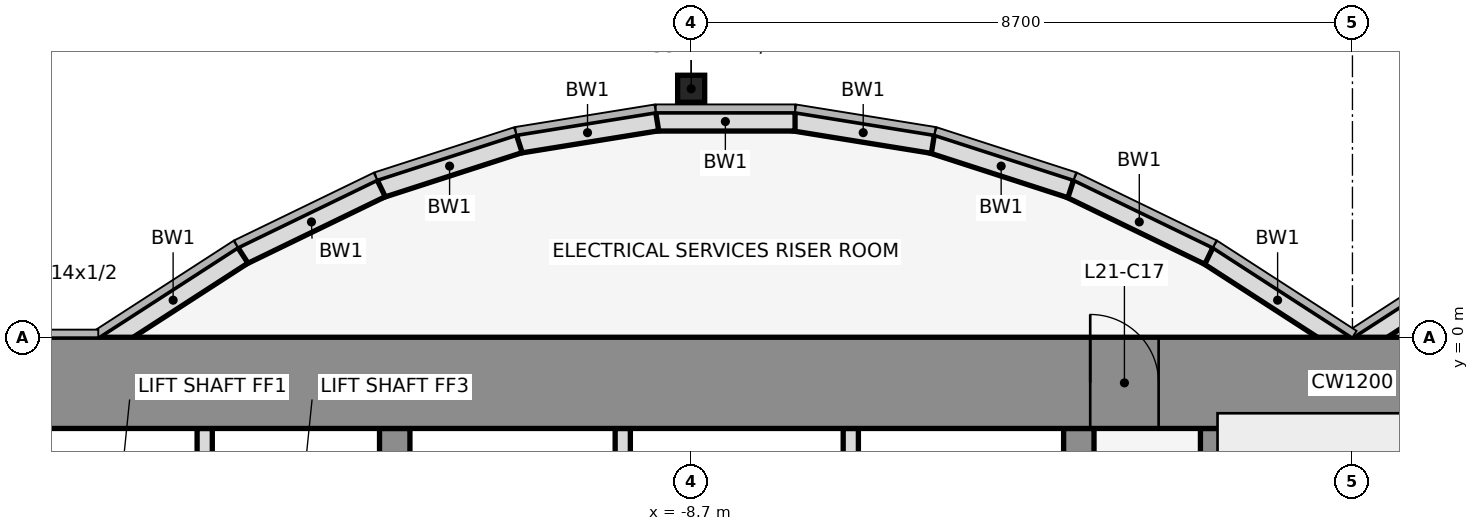
"""IFC4 building model, lengths in metres.
Left out: names, types, materials, properties, quantities, classifications, styles, units other than length and angle.
Written with IfcOpenShell. Run it as: python <this file> out.ifc"""

import sys

from ifc_helpers import new_model, si_unit, direction, frame, frame_2d, origin, origin_2d, place, context, subcontext, project, spatial, rectangle, hollow_rectangle, extrude, element, fill, save


model = new_model("IFC4")
c1 = context("Model", 3, precision=1e-05, world=origin(), true_north=direction((0.0, 1.0)))
c2 = subcontext(c1, "Body", "Model", "MODEL_VIEW")
j1 = project(units=[si_unit("LENGTHUNIT", "METRE"), si_unit("PLANEANGLEUNIT", "RADIAN")], contexts=[c1])
p1 = place(None, origin())
s1 = spatial("IfcSite", under=j1, at=p1, CompositionType="ELEMENT")
p2 = place(p1, origin())
s2 = spatial("IfcBuilding", under=s1, at=p2, CompositionType="ELEMENT")
p3 = place(p2, frame((0.0, 0.0, 102.2)))
s3 = spatial("IfcBuildingStorey", under=s2, at=p3, CompositionType="ELEMENT", Elevation=102.2)
p4 = place(p3, frame((-8.7, 3.269, 0.0), z_axis=(0.0, 0.0, 1.0), x_axis=(1.0, 0.0, 0.0)))
e1 = element("IfcColumn", 1, at=p4, inside=s3, PredefinedType="COLUMN", context=c2, shape_type="SweptSolid", body=[
    extrude(hollow_rectangle(XDim=0.356, YDim=0.356, WallThickness=0.012, at=origin_2d()), origin(), (0.0, 0.0, 1.0), 4.1),
])
for number, where, z_axis, x_axis in (
    (2, (1.901, 1.08, 0.0), (0.0, 0.0, 1.0), (-0.84, -0.543, 0.0)),
    (3, (-0.068, -0.105, 0.0), (0.0, 0.0, 1.0), (-0.84, 0.543, 0.0)),
):
    element("IfcWall", number, at=place(p3, frame(where, z_axis=z_axis, x_axis=x_axis)), inside=s3, PredefinedType="STANDARD", context=c2, shape_type="SweptSolid", body=[
        extrude(rectangle(XDim=2.183, YDim=0.25, at=frame_2d((1.091, 0.0))), origin(), (0.0, 0.0, 1.0), 3.95),
    ])
p5 = place(p3, frame((-1.888, 1.073, 0.0), z_axis=(0.0, 0.0, 1.0), x_axis=(-0.89982408427, 0.436252928206, 0.0)))
e4 = element("IfcWall", 4, at=p5, inside=s3, PredefinedType="STANDARD", context=c2, shape_type="SweptSolid", body=[
    extrude(rectangle(XDim=2.038, YDim=0.25, at=frame_2d((1.019, 0.0))), origin(), (0.0, 0.0, 1.0), 3.95),
])
p6 = place(p3, frame((-3.705, 1.955, 0.0), z_axis=(0.0, 0.0, 1.0), x_axis=(-0.951495806175, 0.307661714928, 0.0)))
e5 = element("IfcWall", 5, at=p6, inside=s3, PredefinedType="STANDARD", context=c2, shape_type="SweptSolid", body=[
    extrude(rectangle(XDim=1.927, YDim=0.25, at=frame_2d((0.963, 0.0))), origin(), (0.0, 0.0, 1.0), 3.95),
])
p7 = place(p3, frame((-5.52, 2.543, 0.0), z_axis=(0.0, 0.0, 1.0), x_axis=(-0.987181718931, 0.159600293885, 0.0)))
e6 = element("IfcWall", 6, at=p7, inside=s3, PredefinedType="STANDARD", context=c2, shape_type="SweptSolid", body=[
    extrude(rectangle(XDim=1.857, YDim=0.25, at=frame_2d((0.929, 0.0))), origin(), (0.0, 0.0, 1.0), 3.95),
])
p8 = place(p3, frame((-7.333, 2.838, 0.0), z_axis=(0.0, 0.0, 1.0), x_axis=(-1.0, 0.0, 0.0)))
e7 = element("IfcWall", 7, at=p8, inside=s3, PredefinedType="STANDARD", context=c2, shape_type="SweptSolid", body=[
    extrude(rectangle(XDim=1.833, YDim=0.25, at=frame_2d((0.917, 0.0))), origin(), (0.0, 0.0, 1.0), 3.95),
])
p9 = place(p3, frame((-9.147, 2.84, 0.0), z_axis=(0.0, 0.0, 1.0), x_axis=(-0.987181718931, -0.159600293885, 0.0)))
e8 = element("IfcWall", 8, at=p9, inside=s3, PredefinedType="STANDARD", context=c2, shape_type="SweptSolid", body=[
    extrude(rectangle(XDim=1.857, YDim=0.25, at=frame_2d((0.929, 0.0))), origin(), (0.0, 0.0, 1.0), 3.95),
])
p10 = place(p3, frame((-10.962, 2.548, 0.0), z_axis=(0.0, 0.0, 1.0), x_axis=(-0.951495806175, -0.307661714928, 0.0)))
e9 = element("IfcWall", 9, at=p10, inside=s3, PredefinedType="STANDARD", context=c2, shape_type="SweptSolid", body=[
    extrude(rectangle(XDim=1.927, YDim=0.25, at=frame_2d((0.963, 0.0))), origin(), (0.0, 0.0, 1.0), 3.95),
])
p11 = place(p3, frame((-12.779, 1.962, 0.0), z_axis=(0.0, 0.0, 1.0), x_axis=(-0.89982408427, -0.436252928206, 0.0)))
e10 = element("IfcWall", 10, at=p11, inside=s3, PredefinedType="STANDARD", context=c2, shape_type="SweptSolid", body=[
    extrude(rectangle(XDim=2.038, YDim=0.25, at=frame_2d((1.019, 0.0))), origin(), (0.0, 0.0, 1.0), 3.95),
])
p12 = place(p3, frame((-14.599, 1.08, 0.0), z_axis=(0.0, 0.0, 1.0), x_axis=(-0.83981312244, -0.542875602121, 0.0)))
e11 = element("IfcWall", 11, at=p12, inside=s3, PredefinedType="STANDARD", context=c2, shape_type="SweptSolid", body=[
    extrude(rectangle(XDim=2.183, YDim=0.25, at=frame_2d((1.091, 0.0))), origin(), (0.0, 0.0, 1.0), 3.95),
])
p13 = place(p3, frame((-15.1, -4.6, 0.0), z_axis=(0.0, 0.0, 1.0), x_axis=(0.0, 1.0, 0.0)))
e12 = element("IfcWall", 12, at=p13, inside=s3, PredefinedType="PARTITIONING", context=c2, shape_type="SweptSolid", body=[
    extrude(rectangle(XDim=3.4, YDim=0.2, at=frame_2d((1.7, 0.0))), origin(), (0.0, 0.0, 1.0), 3.018),
])
p14 = place(p3, frame((-12.6, -11.8, 0.0), z_axis=(0.0, 0.0, 1.0), x_axis=(0.0, 1.0, 0.0)))
e13 = element("IfcWall", 13, at=p14, inside=s3, PredefinedType="SHEAR", context=c2, shape_type="SweptSolid", body=[
    extrude(rectangle(XDim=10.6, YDim=0.4, at=frame_2d((5.3, 0.0))), origin(), (0.0, 0.0, 1.0), 4.1),
])
p15 = place(p14, frame((4.75, 0.0, 0.0)))
e14 = element("IfcOpeningElement", 14, at=p15, cuts=e13, PredefinedType="OPENING", context=c2, shape_type="SweptSolid", body=[
    extrude(rectangle(XDim=1.1, YDim=2.1, at=frame_2d((0.55, 1.05))), frame((0.0, 0.212, 0.0), z_axis=(0.0, -1.0, 0.0), x_axis=(1.0, 0.0, 0.0)), (0.0, 0.0, 1.0), 0.424),
])
for number, where, z_axis, x_axis in (
    (15, (-9.6, -4.6, 0.0), (0.0, 0.0, 1.0), (0.0, 1.0, 0.0)),
    (16, (-6.6, -4.6, 0.0), (0.0, 0.0, 1.0), (0.0, 1.0, 0.0)),
):
    element("IfcWall", number, at=place(p3, frame(where, z_axis=z_axis, x_axis=x_axis)), inside=s3, PredefinedType="PARTITIONING", context=c2, shape_type="SweptSolid", body=[
        extrude(rectangle(XDim=3.4, YDim=0.2, at=frame_2d((1.7, 0.0))), origin(), (0.0, 0.0, 1.0), 3.018),
    ])
p16 = place(p3, frame((-3.6, -11.8, 0.0), z_axis=(0.0, 0.0, 1.0), x_axis=(0.0, 1.0, 0.0)))
e17 = element("IfcWall", 17, at=p16, inside=s3, PredefinedType="SHEAR", context=c2, shape_type="SweptSolid", body=[
    extrude(rectangle(XDim=10.6, YDim=0.4, at=frame_2d((5.3, 0.0))), origin(), (0.0, 0.0, 1.0), 4.1),
])
p17 = place(p16, frame((4.85, 0.0, 0.0)))
e18 = element("IfcOpeningElement", 18, at=p17, cuts=e17, PredefinedType="OPENING", context=c2, shape_type="SweptSolid", body=[
    extrude(rectangle(XDim=0.9, YDim=2.1, at=frame_2d((0.45, 1.05))), frame((0.0, 0.212, 0.0), z_axis=(0.0, -1.0, 0.0), x_axis=(1.0, 0.0, 0.0)), (0.0, 0.0, 1.0), 0.424),
])
p18 = place(p3, frame((-1.8, -11.8, 0.0), z_axis=(0.0, 0.0, 1.0), x_axis=(0.0, 1.0, 0.0)))
e19 = element("IfcWall", 19, at=p18, inside=s3, PredefinedType="SHEAR", context=c2, shape_type="SweptSolid", body=[
    extrude(rectangle(XDim=10.6, YDim=0.4, at=frame_2d((5.3, 0.0))), origin(), (0.0, 0.0, 1.0), 4.1),
])
p19 = place(p3, frame((-22.0, -0.6, 0.0), z_axis=(0.0, 0.0, 1.0), x_axis=(1.0, 0.0, 0.0)))
e20 = element("IfcWall", 20, at=p19, inside=s3, PredefinedType="SHEAR", context=c2, shape_type="SweptSolid", body=[
    extrude(rectangle(XDim=44.0, YDim=1.2, at=frame_2d((22.0, 0.0))), origin(), (0.0, 0.0, 1.0), 4.1),
])
p20 = place(p19, frame((18.55, 0.0, 0.0)))
e21 = element("IfcOpeningElement", 21, at=p20, cuts=e20, PredefinedType="OPENING", context=c2, shape_type="SweptSolid", body=[
    extrude(rectangle(XDim=0.9, YDim=2.1, at=frame_2d((0.45, 1.05))), frame((0.0, 0.612, 0.0), z_axis=(0.0, -1.0, 0.0), x_axis=(1.0, 0.0, 0.0)), (0.0, 0.0, 1.0), 1.224),
])
p21 = place(p19, frame((24.55, 0.0, 0.0)))
e22 = element("IfcOpeningElement", 22, at=p21, cuts=e20, PredefinedType="OPENING", context=c2, shape_type="SweptSolid", body=[
    extrude(rectangle(XDim=0.9, YDim=2.1, at=frame_2d((0.45, 1.05))), frame((0.0, 0.612, 0.0), z_axis=(0.0, -1.0, 0.0), x_axis=(1.0, 0.0, 0.0)), (0.0, 0.0, 1.0), 1.224),
])
p22 = place(p20, origin())
e23 = element("IfcDoor", 23, at=p22, inside=s3, OperationType="SINGLE_SWING_LEFT", PredefinedType="DOOR", context=c2, shape_type="SweptSolid", body=[
    extrude(rectangle(XDim=0.9, YDim=2.1, at=frame_2d((0.45, 1.05))), frame((0.0, 0.025, 0.0), z_axis=(0.0, -1.0, 0.0), x_axis=(1.0, 0.0, 0.0)), (0.0, 0.0, 1.0), 0.05),
])
fill(e21, e23)
save(model, sys.argv[1])
